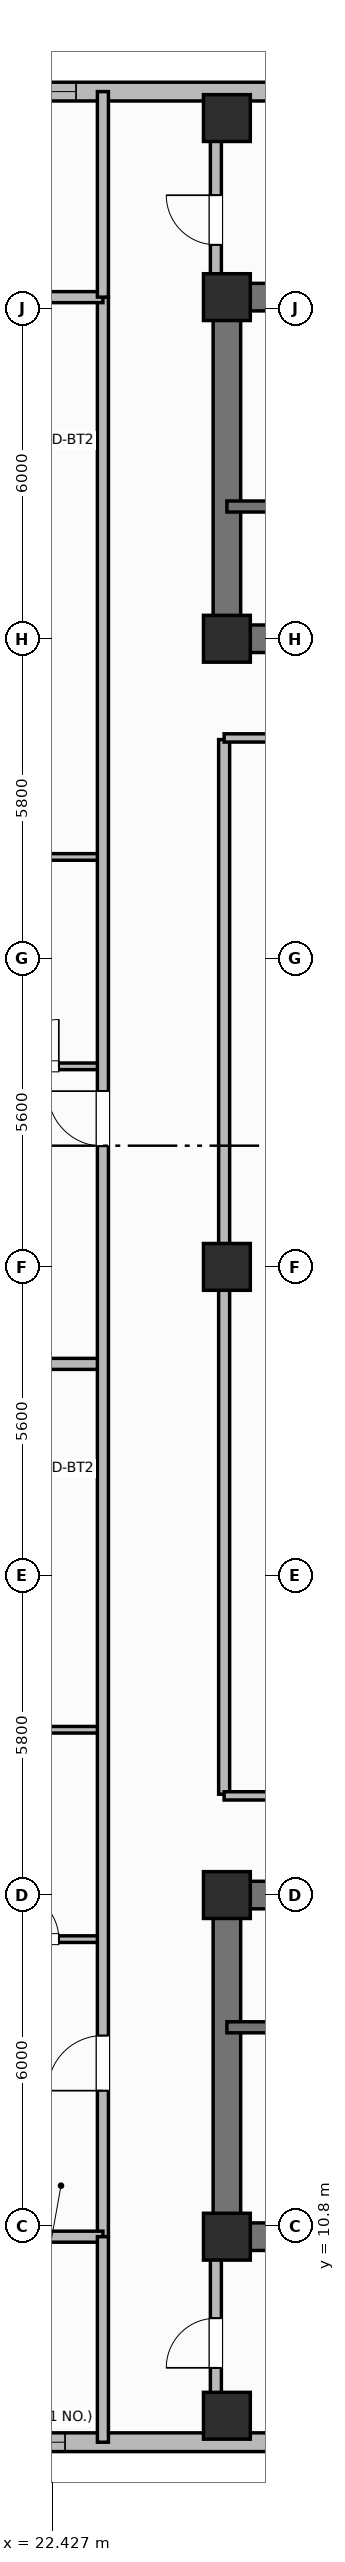
"""IFC4 building model, lengths in metres.
Left out: names, types, materials, properties, quantities, classifications, styles, units other than length and angle.
Written with IfcOpenShell. Run it as: python <this file> out.ifc"""

import sys

from ifc_helpers import new_model, si_unit, direction, frame, frame_2d, origin, origin_2d, place, context, subcontext, project, spatial, rectangle, extrude, element, fill, save


model = new_model("IFC4")
c1 = context("Model", 3, precision=1e-05, world=origin(), true_north=direction((0.0, 1.0)))
c2 = subcontext(c1, "Body", "Model", "MODEL_VIEW")
j1 = project(units=[si_unit("LENGTHUNIT", "METRE"), si_unit("PLANEANGLEUNIT", "RADIAN")], contexts=[c1])
p1 = place(None, origin())
s1 = spatial("IfcSite", under=j1, at=p1, CompositionType="ELEMENT")
p2 = place(p1, origin())
s2 = spatial("IfcBuilding", under=s1, at=p2, CompositionType="ELEMENT")
p3 = place(p2, frame((0.0, 0.0, 211.0)))
s3 = spatial("IfcBuildingStorey", under=s2, at=p3, CompositionType="ELEMENT", Elevation=211.0)
p4 = place(p3, frame((52.8, 10.6, 0.0), z_axis=(0.0, 0.0, 1.0), x_axis=(-1.0, 0.0, 0.0)))
e1 = element("IfcWall", 1, at=p4, inside=s3, PredefinedType="SHEAR", context=c2, shape_type="SweptSolid", body=[
    extrude(rectangle(XDim=27.2, YDim=0.5, at=frame_2d((13.6, 0.0))), origin(), (0.0, 0.0, 1.0), 3.7),
])
p5 = place(p3, frame((25.6, 10.85, 0.0), z_axis=(0.0, 0.0, 1.0), x_axis=(0.0, 1.0, 0.0)))
e2 = element("IfcWall", 2, at=p5, inside=s3, PredefinedType="SHEAR", context=c2, shape_type="SweptSolid", body=[
    extrude(rectangle(XDim=5.7, YDim=0.5, at=frame_2d((2.85, 0.0))), origin(), (0.0, 0.0, 1.0), 3.7),
])
p6 = place(p3, frame((25.6, 16.8, 0.0), z_axis=(0.0, 0.0, 1.0), x_axis=(1.0, 0.0, 0.0)))
e3 = element("IfcWall", 3, at=p6, inside=s3, PredefinedType="SHEAR", context=c2, shape_type="SweptSolid", body=[
    extrude(rectangle(XDim=27.2, YDim=0.5, at=frame_2d((13.6, 0.0))), origin(), (0.0, 0.0, 1.0), 3.7),
])
p7 = place(p6, frame((1.9, 0.0, 0.0)))
e4 = element("IfcOpeningElement", 4, at=p7, cuts=e3, PredefinedType="OPENING", context=c2, shape_type="SweptSolid", body=[
    extrude(rectangle(XDim=1.1, YDim=2.15, at=frame_2d((0.55, 1.075))), frame((0.0, 0.26, 0.0), z_axis=(0.0, -1.0, 0.0), x_axis=(1.0, 0.0, 0.0)), (0.0, 0.0, 1.0), 0.52),
])
p8 = place(p6, frame((13.0, 0.0, 0.0)))
e5 = element("IfcOpeningElement", 5, at=p8, cuts=e3, PredefinedType="OPENING", context=c2, shape_type="SweptSolid", body=[
    extrude(rectangle(XDim=1.2, YDim=2.15, at=frame_2d((0.6, 1.075))), frame((0.0, 0.26, 0.0), z_axis=(0.0, -1.0, 0.0), x_axis=(1.0, 0.0, 0.0)), (0.0, 0.0, 1.0), 0.52),
])
p9 = place(p6, frame((21.6, 0.0, 0.0)))
e6 = element("IfcOpeningElement", 6, at=p9, cuts=e3, PredefinedType="OPENING", context=c2, shape_type="SweptSolid", body=[
    extrude(rectangle(XDim=1.0, YDim=2.15, at=frame_2d((0.5, 1.075))), frame((0.0, 0.26, 0.0), z_axis=(0.0, -1.0, 0.0), x_axis=(1.0, 0.0, 0.0)), (0.0, 0.0, 1.0), 0.52),
])
p10 = place(p3, frame((25.6, 45.8, 0.0), z_axis=(0.0, 0.0, 1.0), x_axis=(1.0, 0.0, 0.0)))
e7 = element("IfcWall", 7, at=p10, inside=s3, PredefinedType="SHEAR", context=c2, shape_type="SweptSolid", body=[
    extrude(rectangle(XDim=27.2, YDim=0.5, at=frame_2d((13.6, 0.0))), origin(), (0.0, 0.0, 1.0), 3.7),
])
p11 = place(p3, frame((25.6, 39.85, 0.0), z_axis=(0.0, 0.0, 1.0), x_axis=(0.0, 1.0, 0.0)))
e8 = element("IfcWall", 8, at=p11, inside=s3, PredefinedType="SHEAR", context=c2, shape_type="SweptSolid", body=[
    extrude(rectangle(XDim=5.7, YDim=0.5, at=frame_2d((2.85, 0.0))), origin(), (0.0, 0.0, 1.0), 3.7),
])
p12 = place(p3, frame((52.8, 39.6, 0.0), z_axis=(0.0, 0.0, 1.0), x_axis=(-1.0, 0.0, 0.0)))
e9 = element("IfcWall", 9, at=p12, inside=s3, PredefinedType="SHEAR", context=c2, shape_type="SweptSolid", body=[
    extrude(rectangle(XDim=27.2, YDim=0.5, at=frame_2d((13.6, 0.0))), origin(), (0.0, 0.0, 1.0), 3.7),
])
p13 = place(p12, frame((24.2, 0.0, 0.0)))
e10 = element("IfcOpeningElement", 10, at=p13, cuts=e9, PredefinedType="OPENING", context=c2, shape_type="SweptSolid", body=[
    extrude(rectangle(XDim=1.1, YDim=2.15, at=frame_2d((0.55, 1.075))), frame((0.0, 0.26, 0.0), z_axis=(0.0, -1.0, 0.0), x_axis=(1.0, 0.0, 0.0)), (0.0, 0.0, 1.0), 0.52),
])
p14 = place(p12, frame((15.1, 0.0, 0.0)))
e11 = element("IfcOpeningElement", 11, at=p14, cuts=e9, PredefinedType="OPENING", context=c2, shape_type="SweptSolid", body=[
    extrude(rectangle(XDim=1.2, YDim=2.15, at=frame_2d((0.6, 1.075))), frame((0.0, 0.26, 0.0), z_axis=(0.0, -1.0, 0.0), x_axis=(1.0, 0.0, 0.0)), (0.0, 0.0, 1.0), 0.52),
])
p15 = place(p12, frame((11.6, 0.0, 0.0)))
e12 = element("IfcOpeningElement", 12, at=p15, cuts=e9, PredefinedType="OPENING", context=c2, shape_type="SweptSolid", body=[
    extrude(rectangle(XDim=0.9, YDim=2.1, at=frame_2d((0.45, 1.05))), frame((0.0, 0.26, 0.0), z_axis=(0.0, -1.0, 0.0), x_axis=(1.0, 0.0, 0.0)), (0.0, 0.0, 1.0), 0.52),
])
p16 = place(p12, frame((7.35, 0.0, 0.0)))
e13 = element("IfcOpeningElement", 13, at=p16, cuts=e9, PredefinedType="OPENING", context=c2, shape_type="SweptSolid", body=[
    extrude(rectangle(XDim=0.85, YDim=2.1, at=frame_2d((0.425, 1.05))), frame((0.0, 0.26, 0.0), z_axis=(0.0, -1.0, 0.0), x_axis=(1.0, 0.0, 0.0)), (0.0, 0.0, 1.0), 0.52),
])
p17 = place(p12, frame((4.2, 0.0, 0.0)))
e14 = element("IfcOpeningElement", 14, at=p17, cuts=e9, PredefinedType="OPENING", context=c2, shape_type="SweptSolid", body=[
    extrude(rectangle(XDim=1.3, YDim=2.2, at=frame_2d((0.65, 1.1))), frame((0.0, 0.26, 0.0), z_axis=(0.0, -1.0, 0.0), x_axis=(1.0, 0.0, 0.0)), (0.0, 0.0, 1.0), 0.52),
])
for number, where, z_axis, x_axis in (
    (15, (25.6, 10.6, 0.0), (0.0, 0.0, 1.0), (1.0, 0.0, 0.0)),
    (16, (25.6, 16.8, 0.0), (0.0, 0.0, 1.0), (1.0, 0.0, 0.0)),
    (17, (25.6, 39.6, 0.0), (0.0, 0.0, 1.0), (1.0, 0.0, 0.0)),
    (18, (25.6, 45.8, 0.0), (0.0, 0.0, 1.0), (1.0, 0.0, 0.0)),
    (19, (25.6, 28.2, 0.0), (0.0, 0.0, 1.0), (1.0, 0.0, 0.0)),
    (20, (25.6, 7.35, 0.0), (0.0, 0.0, 1.0), (1.0, 0.0, 0.0)),
    (21, (25.6, 49.05, 0.0), (0.0, 0.0, 1.0), (1.0, 0.0, 0.0)),
):
    element("IfcColumn", number, at=place(p3, frame(where, z_axis=z_axis, x_axis=x_axis)), inside=s3, PredefinedType="COLUMN", context=c2, shape_type="SweptSolid", body=[
        extrude(rectangle(XDim=0.85, YDim=0.85, at=origin_2d()), origin(), (0.0, 0.0, 1.0), 3.7),
    ])
p18 = place(p3, frame((20.2, 6.87, 0.0), z_axis=(0.0, 0.0, 1.0), x_axis=(1.0, 0.0, 0.0)))
e22 = element("IfcWall", 22, at=p18, inside=s3, PredefinedType="SOLIDWALL", context=c2, shape_type="SweptSolid", body=[
    extrude(rectangle(XDim=15.8, YDim=0.34, at=frame_2d((7.9, 0.0))), origin(), (0.0, 0.0, 1.0), 2.72),
])
p19 = place(p18, frame((1.062, 0.0, 0.75)))
e23 = element("IfcOpeningElement", 23, at=p19, cuts=e22, PredefinedType="OPENING", context=c2, shape_type="SweptSolid", body=[
    extrude(rectangle(XDim=1.4, YDim=1.85, at=frame_2d((0.7, 0.925))), frame((0.0, 0.18, 0.0), z_axis=(0.0, -1.0, 0.0), x_axis=(1.0, 0.0, 0.0)), (0.0, 0.0, 1.0), 0.36),
])
p20 = place(p18, frame((8.663, 0.0, 0.75)))
e24 = element("IfcOpeningElement", 24, at=p20, cuts=e22, PredefinedType="OPENING", context=c2, shape_type="SweptSolid", body=[
    extrude(rectangle(XDim=1.4, YDim=1.85, at=frame_2d((0.7, 0.925))), frame((0.0, 0.18, 0.0), z_axis=(0.0, -1.0, 0.0), x_axis=(1.0, 0.0, 0.0)), (0.0, 0.0, 1.0), 0.36),
])
p21 = place(p18, frame((12.288, 0.0, 0.75)))
e25 = element("IfcOpeningElement", 25, at=p21, cuts=e22, PredefinedType="OPENING", context=c2, shape_type="SweptSolid", body=[
    extrude(rectangle(XDim=1.4, YDim=1.85, at=frame_2d((0.7, 0.925))), frame((0.0, 0.18, 0.0), z_axis=(0.0, -1.0, 0.0), x_axis=(1.0, 0.0, 0.0)), (0.0, 0.0, 1.0), 0.36),
])
p22 = place(p3, frame((36.0, 49.53, 0.0), z_axis=(0.0, 0.0, 1.0), x_axis=(-1.0, 0.0, 0.0)))
e26 = element("IfcWall", 26, at=p22, inside=s3, PredefinedType="SOLIDWALL", context=c2, shape_type="SweptSolid", body=[
    extrude(rectangle(XDim=15.8, YDim=0.34, at=frame_2d((7.9, 0.0))), origin(), (0.0, 0.0, 1.0), 2.72),
])
p23 = place(p22, frame((5.188, 0.0, 0.75)))
e27 = element("IfcOpeningElement", 27, at=p23, cuts=e26, PredefinedType="OPENING", context=c2, shape_type="SweptSolid", body=[
    extrude(rectangle(XDim=1.8, YDim=1.85, at=frame_2d((0.9, 0.925))), frame((0.0, 0.18, 0.0), z_axis=(0.0, -1.0, 0.0), x_axis=(1.0, 0.0, 0.0)), (0.0, 0.0, 1.0), 0.36),
])
p24 = place(p22, frame((13.137, 0.0, 0.75)))
e28 = element("IfcOpeningElement", 28, at=p24, cuts=e26, PredefinedType="OPENING", context=c2, shape_type="SweptSolid", body=[
    extrude(rectangle(XDim=1.8, YDim=1.85, at=frame_2d((0.9, 0.925))), frame((0.0, 0.18, 0.0), z_axis=(0.0, -1.0, 0.0), x_axis=(1.0, 0.0, 0.0)), (0.0, 0.0, 1.0), 0.36),
])
p25 = place(p3, frame((25.6, 14.4, 0.0), z_axis=(0.0, 0.0, 1.0), x_axis=(1.0, 0.0, 0.0)))
e29 = element("IfcWall", 29, at=p25, inside=s3, PredefinedType="SHEAR", context=c2, shape_type="SweptSolid", body=[
    extrude(rectangle(XDim=9.55, YDim=0.2, at=frame_2d((4.775, 0.0))), origin(), (0.0, 0.0, 1.0), 3.7),
])
p26 = place(p25, frame((1.05, 0.0, 0.0)))
e30 = element("IfcOpeningElement", 30, at=p26, cuts=e29, PredefinedType="OPENING", context=c2, shape_type="SweptSolid", body=[
    extrude(rectangle(XDim=1.1, YDim=2.15, at=frame_2d((0.55, 1.075))), frame((0.0, 0.11, 0.0), z_axis=(0.0, -1.0, 0.0), x_axis=(1.0, 0.0, 0.0)), (0.0, 0.0, 1.0), 0.22),
])
p27 = place(p3, frame((35.15, 42.0, 0.0), z_axis=(0.0, 0.0, 1.0), x_axis=(-1.0, 0.0, 0.0)))
e31 = element("IfcWall", 31, at=p27, inside=s3, PredefinedType="SHEAR", context=c2, shape_type="SweptSolid", body=[
    extrude(rectangle(XDim=9.55, YDim=0.2, at=frame_2d((4.775, 0.0))), origin(), (0.0, 0.0, 1.0), 3.7),
])
p28 = place(p27, frame((7.25, 0.0, 0.0)))
e32 = element("IfcOpeningElement", 32, at=p28, cuts=e31, PredefinedType="OPENING", context=c2, shape_type="SweptSolid", body=[
    extrude(rectangle(XDim=1.1, YDim=2.15, at=frame_2d((0.55, 1.075))), frame((0.0, 0.11, 0.0), z_axis=(0.0, -1.0, 0.0), x_axis=(1.0, 0.0, 0.0)), (0.0, 0.0, 1.0), 0.22),
])
p29 = place(p3, frame((25.55, 18.63, 0.0), z_axis=(0.0, 0.0, 1.0), x_axis=(0.0, 1.0, 0.0)))
e33 = element("IfcWall", 33, at=p29, inside=s3, PredefinedType="PARTITIONING", context=c2, shape_type="SweptSolid", body=[
    extrude(rectangle(XDim=19.14, YDim=0.2, at=frame_2d((9.57, 0.0))), origin(), (0.0, 0.0, 1.0), 2.55),
])
for number, where, z_axis, x_axis in (
    (34, (25.55, 18.6, 0.0), (0.0, 0.0, 1.0), (1.0, 0.0, 0.0)),
    (35, (25.55, 37.8, 0.0), (0.0, 0.0, 1.0), (1.0, 0.0, 0.0)),
):
    element("IfcWall", number, at=place(p3, frame(where, z_axis=z_axis, x_axis=x_axis)), inside=s3, PredefinedType="PARTITIONING", context=c2, shape_type="SweptSolid", body=[
        extrude(rectangle(XDim=22.2, YDim=0.15, at=frame_2d((11.1, 0.0))), origin(), (0.0, 0.0, 1.0), 2.55),
    ])
p30 = place(p3, frame((21.1, 16.0, 0.0), z_axis=(0.0, 0.0, 1.0), x_axis=(1.0, 0.0, 0.0)))
e36 = element("IfcWall", 36, at=p30, inside=s3, PredefinedType="PARTITIONING", context=c2, shape_type="SweptSolid", body=[
    extrude(rectangle(XDim=2.25, YDim=0.12, at=frame_2d((1.125, 0.0))), origin(), (0.0, 0.0, 1.0), 2.55),
])
p31 = place(p30, frame((0.6, 0.0, 0.0)))
e37 = element("IfcOpeningElement", 37, at=p31, cuts=e36, PredefinedType="OPENING", context=c2, shape_type="SweptSolid", body=[
    extrude(rectangle(XDim=0.85, YDim=2.1, at=frame_2d((0.425, 1.05))), frame((0.0, 0.07, 0.0), z_axis=(0.0, -1.0, 0.0), x_axis=(1.0, 0.0, 0.0)), (0.0, 0.0, 1.0), 0.14),
])
p32 = place(p3, frame((21.1, 19.8, 0.0), z_axis=(0.0, 0.0, 1.0), x_axis=(1.0, 0.0, 0.0)))
e38 = element("IfcWall", 38, at=p32, inside=s3, PredefinedType="PARTITIONING", context=c2, shape_type="SweptSolid", body=[
    extrude(rectangle(XDim=2.25, YDim=0.12, at=frame_2d((1.125, 0.0))), origin(), (0.0, 0.0, 1.0), 2.55),
])
p33 = place(p3, frame((17.016, 26.44, 0.0), z_axis=(0.0, 0.0, 1.0), x_axis=(1.0, 0.0, 0.0)))
e39 = element("IfcWall", 39, at=p33, inside=s3, PredefinedType="PARTITIONING", context=c2, shape_type="SweptSolid", body=[
    extrude(rectangle(XDim=6.334, YDim=0.2, at=frame_2d((3.167, 0.0))), origin(), (0.0, 0.0, 1.0), 2.55),
])
p34 = place(p3, frame((21.1, 31.84, 0.0), z_axis=(0.0, 0.0, 1.0), x_axis=(1.0, 0.0, 0.0)))
e40 = element("IfcWall", 40, at=p34, inside=s3, PredefinedType="PARTITIONING", context=c2, shape_type="SweptSolid", body=[
    extrude(rectangle(XDim=2.25, YDim=0.12, at=frame_2d((1.125, 0.0))), origin(), (0.0, 0.0, 1.0), 2.55),
])
p35 = place(p34, frame((0.6, 0.0, 0.0)))
e41 = element("IfcOpeningElement", 41, at=p35, cuts=e40, PredefinedType="OPENING", context=c2, shape_type="SweptSolid", body=[
    extrude(rectangle(XDim=0.85, YDim=2.1, at=frame_2d((0.425, 1.05))), frame((0.0, 0.07, 0.0), z_axis=(0.0, -1.0, 0.0), x_axis=(1.0, 0.0, 0.0)), (0.0, 0.0, 1.0), 0.14),
])
p36 = place(p3, frame((21.1, 35.64, 0.0), z_axis=(0.0, 0.0, 1.0), x_axis=(1.0, 0.0, 0.0)))
e42 = element("IfcWall", 42, at=p36, inside=s3, PredefinedType="PARTITIONING", context=c2, shape_type="SweptSolid", body=[
    extrude(rectangle(XDim=2.25, YDim=0.12, at=frame_2d((1.125, 0.0))), origin(), (0.0, 0.0, 1.0), 2.55),
])
p37 = place(p3, frame((23.35, 10.6, 0.0), z_axis=(0.0, 0.0, 1.0), x_axis=(0.0, 1.0, 0.0)))
e43 = element("IfcWall", 43, at=p37, inside=s3, PredefinedType="PARTITIONING", context=c2, shape_type="SweptSolid", body=[
    extrude(rectangle(XDim=35.2, YDim=0.2, at=frame_2d((17.6, 0.0))), origin(), (0.0, 0.0, 1.0), 2.55),
])
p38 = place(p37, frame((2.65, 0.0, 0.0)))
e44 = element("IfcOpeningElement", 44, at=p38, cuts=e43, PredefinedType="OPENING", context=c2, shape_type="SweptSolid", body=[
    extrude(rectangle(XDim=1.0, YDim=2.15, at=frame_2d((0.5, 1.075))), frame((0.0, 0.11, 0.0), z_axis=(0.0, -1.0, 0.0), x_axis=(1.0, 0.0, 0.0)), (0.0, 0.0, 1.0), 0.22),
])
p39 = place(p37, frame((19.79, 0.0, 0.0)))
e45 = element("IfcOpeningElement", 45, at=p39, cuts=e43, PredefinedType="OPENING", context=c2, shape_type="SweptSolid", body=[
    extrude(rectangle(XDim=1.0, YDim=2.15, at=frame_2d((0.5, 1.075))), frame((0.0, 0.11, 0.0), z_axis=(0.0, -1.0, 0.0), x_axis=(1.0, 0.0, 0.0)), (0.0, 0.0, 1.0), 0.22),
])
for number, where, z_axis, x_axis in (
    (46, (16.99, 10.6, 0.0), (0.0, 0.0, 1.0), (1.0, 0.0, 0.0)),
    (47, (16.99, 45.8, 0.0), (0.0, 0.0, 1.0), (1.0, 0.0, 0.0)),
):
    element("IfcWall", number, at=place(p3, frame(where, z_axis=z_axis, x_axis=x_axis)), inside=s3, PredefinedType="PARTITIONING", context=c2, shape_type="SweptSolid", body=[
        extrude(rectangle(XDim=6.36, YDim=0.2, at=frame_2d((3.18, 0.0))), origin(), (0.0, 0.0, 1.0), 2.55),
    ])
for number, where, z_axis, x_axis in (
    (48, (23.35, 6.87, 0.0), (0.0, 0.0, 1.0), (0.0, 1.0, 0.0)),
    (49, (23.35, 45.8, 0.0), (0.0, 0.0, 1.0), (0.0, 1.0, 0.0)),
):
    element("IfcWall", number, at=place(p3, frame(where, z_axis=z_axis, x_axis=x_axis)), inside=s3, PredefinedType="PARTITIONING", context=c2, shape_type="SweptSolid", body=[
        extrude(rectangle(XDim=3.73, YDim=0.2, at=frame_2d((1.865, 0.0))), origin(), (0.0, 0.0, 1.0), 2.55),
    ])
p40 = place(p3, frame((25.4, 7.57, 0.0), z_axis=(0.0, 0.0, 1.0), x_axis=(0.0, 1.0, 0.0)))
e50 = element("IfcWall", 50, at=p40, inside=s3, PredefinedType="PARTITIONING", context=c2, shape_type="SweptSolid", body=[
    extrude(rectangle(XDim=2.73, YDim=0.2, at=frame_2d((1.365, 0.0))), origin(), (0.0, 0.0, 1.0), 2.55),
])
p41 = place(p40, frame((0.65, 0.0, 0.0)))
e51 = element("IfcOpeningElement", 51, at=p41, cuts=e50, PredefinedType="OPENING", context=c2, shape_type="SweptSolid", body=[
    extrude(rectangle(XDim=0.9, YDim=2.1, at=frame_2d((0.45, 1.05))), frame((0.0, 0.11, 0.0), z_axis=(0.0, -1.0, 0.0), x_axis=(1.0, 0.0, 0.0)), (0.0, 0.0, 1.0), 0.22),
])
p42 = place(p3, frame((25.4, 46.1, 0.0), z_axis=(0.0, 0.0, 1.0), x_axis=(0.0, 1.0, 0.0)))
e52 = element("IfcWall", 52, at=p42, inside=s3, PredefinedType="PARTITIONING", context=c2, shape_type="SweptSolid", body=[
    extrude(rectangle(XDim=2.73, YDim=0.2, at=frame_2d((1.365, 0.0))), origin(), (0.0, 0.0, 1.0), 2.55),
])
p43 = place(p42, frame((0.65, 0.0, 0.0)))
e53 = element("IfcOpeningElement", 53, at=p43, cuts=e52, PredefinedType="OPENING", context=c2, shape_type="SweptSolid", body=[
    extrude(rectangle(XDim=0.9, YDim=2.1, at=frame_2d((0.45, 1.05))), frame((0.0, 0.11, 0.0), z_axis=(0.0, -1.0, 0.0), x_axis=(1.0, 0.0, 0.0)), (0.0, 0.0, 1.0), 0.22),
])
p44 = place(p19, origin())
e54 = element("IfcWindow", 54, at=p44, inside=s3, PartitioningType="SINGLE_PANEL", PredefinedType="WINDOW", context=c2, shape_type="SweptSolid", body=[
    extrude(rectangle(XDim=1.4, YDim=1.85, at=frame_2d((0.7, 0.925))), frame((0.0, 0.03, 0.0), z_axis=(0.0, -1.0, 0.0), x_axis=(1.0, 0.0, 0.0)), (0.0, 0.0, 1.0), 0.06),
])
fill(e23, e54)
p45 = place(p24, origin())
e55 = element("IfcWindow", 55, at=p45, inside=s3, PartitioningType="SINGLE_PANEL", PredefinedType="WINDOW", context=c2, shape_type="SweptSolid", body=[
    extrude(rectangle(XDim=1.8, YDim=1.85, at=frame_2d((0.9, 0.925))), frame((0.0, 0.03, 0.0), z_axis=(0.0, -1.0, 0.0), x_axis=(1.0, 0.0, 0.0)), (0.0, 0.0, 1.0), 0.06),
])
fill(e28, e55)
p46 = place(p31, origin())
e56 = element("IfcDoor", 56, at=p46, inside=s3, OperationType="SINGLE_SWING_LEFT", PredefinedType="DOOR", context=c2, shape_type="SweptSolid", body=[
    extrude(rectangle(XDim=0.85, YDim=2.1, at=frame_2d((0.425, 1.05))), frame((0.0, 0.025, 0.0), z_axis=(0.0, -1.0, 0.0), x_axis=(1.0, 0.0, 0.0)), (0.0, 0.0, 1.0), 0.05),
])
fill(e37, e56)
p47 = place(p35, origin())
e57 = element("IfcDoor", 57, at=p47, inside=s3, OperationType="SINGLE_SWING_RIGHT", PredefinedType="DOOR", context=c2, shape_type="SweptSolid", body=[
    extrude(rectangle(XDim=0.85, YDim=2.1, at=frame_2d((0.425, 1.05))), frame((0.0, 0.025, 0.0), z_axis=(0.0, -1.0, 0.0), x_axis=(1.0, 0.0, 0.0)), (0.0, 0.0, 1.0), 0.05),
])
fill(e41, e57)
p48 = place(p38, origin())
e58 = element("IfcDoor", 58, at=p48, inside=s3, OperationType="SINGLE_SWING_LEFT", PredefinedType="DOOR", context=c2, shape_type="SweptSolid", body=[
    extrude(rectangle(XDim=1.0, YDim=2.15, at=frame_2d((0.5, 1.075))), frame((0.0, 0.025, 0.0), z_axis=(0.0, -1.0, 0.0), x_axis=(1.0, 0.0, 0.0)), (0.0, 0.0, 1.0), 0.05),
])
fill(e44, e58)
p49 = place(p39, origin())
e59 = element("IfcDoor", 59, at=p49, inside=s3, OperationType="SINGLE_SWING_RIGHT", PredefinedType="DOOR", context=c2, shape_type="SweptSolid", body=[
    extrude(rectangle(XDim=1.0, YDim=2.15, at=frame_2d((0.5, 1.075))), frame((0.0, 0.025, 0.0), z_axis=(0.0, -1.0, 0.0), x_axis=(1.0, 0.0, 0.0)), (0.0, 0.0, 1.0), 0.05),
])
fill(e45, e59)
p50 = place(p41, origin())
e60 = element("IfcDoor", 60, at=p50, inside=s3, OperationType="SINGLE_SWING_LEFT", PredefinedType="DOOR", context=c2, shape_type="SweptSolid", body=[
    extrude(rectangle(XDim=0.9, YDim=2.1, at=frame_2d((0.45, 1.05))), frame((0.0, 0.025, 0.0), z_axis=(0.0, -1.0, 0.0), x_axis=(1.0, 0.0, 0.0)), (0.0, 0.0, 1.0), 0.05),
])
fill(e51, e60)
p51 = place(p43, origin())
e61 = element("IfcDoor", 61, at=p51, inside=s3, OperationType="SINGLE_SWING_RIGHT", PredefinedType="DOOR", context=c2, shape_type="SweptSolid", body=[
    extrude(rectangle(XDim=0.9, YDim=2.1, at=frame_2d((0.45, 1.05))), frame((0.0, 0.025, 0.0), z_axis=(0.0, -1.0, 0.0), x_axis=(1.0, 0.0, 0.0)), (0.0, 0.0, 1.0), 0.05),
])
fill(e53, e61)
save(model, sys.argv[1])
